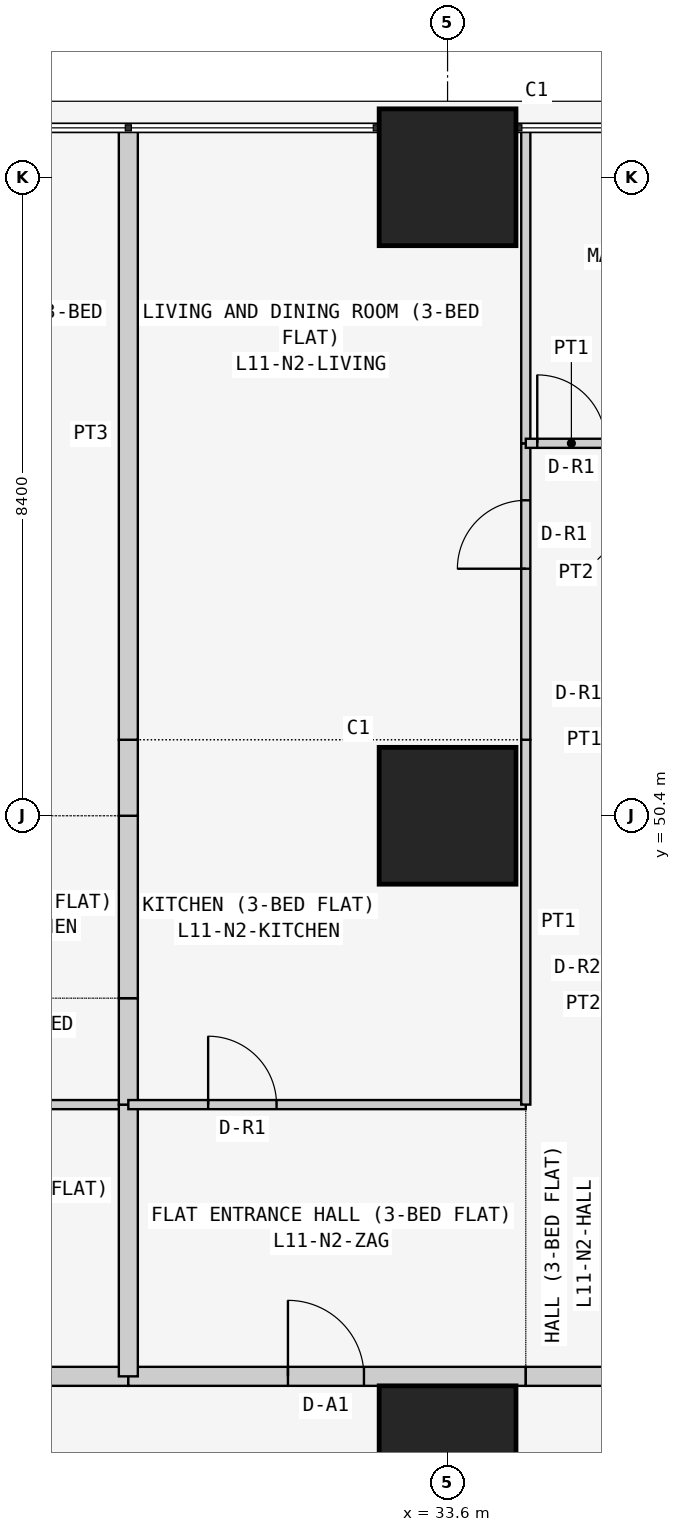
"""IFC4 building model, lengths in metres.
Left out: names, types, materials, properties, quantities, classifications, styles, units other than length and angle.
Written with IfcOpenShell. Run it as: python <this file> out.ifc"""

import sys

from ifc_helpers import new_model, si_unit, direction, frame, frame_2d, origin, origin_2d, place, context, subcontext, project, spatial, rectangle, extrude, element, fill, save


model = new_model("IFC4")
c1 = context("Model", 3, precision=1e-05, world=origin(), true_north=direction((0.0, 1.0)))
c2 = subcontext(c1, "Body", "Model", "MODEL_VIEW")
j1 = project(units=[si_unit("LENGTHUNIT", "METRE"), si_unit("PLANEANGLEUNIT", "RADIAN")], contexts=[c1])
p1 = place(None, origin())
s1 = spatial("IfcSite", under=j1, at=p1, CompositionType="ELEMENT")
p2 = place(p1, origin())
s2 = spatial("IfcBuilding", under=s1, at=p2, CompositionType="ELEMENT")
p3 = place(p2, frame((0.0, 0.0, 48.9)))
s3 = spatial("IfcBuildingStorey", under=s2, at=p3, CompositionType="ELEMENT", Elevation=48.9)
for number, where, z_axis, x_axis in (
    (1, (33.6, 42.0, 0.0), (0.0, 0.0, 1.0), (1.0, 0.0, 0.0)),
    (2, (33.6, 50.4, 0.0), (0.0, 0.0, 1.0), (1.0, 0.0, 0.0)),
    (3, (33.6, 58.8, 0.0), (0.0, 0.0, 1.0), (1.0, 0.0, 0.0)),
):
    element("IfcColumn", number, at=place(p3, frame(where, z_axis=z_axis, x_axis=x_axis)), inside=s3, PredefinedType="COLUMN", context=c2, shape_type="SweptSolid", body=[
        extrude(rectangle(XDim=1.8, YDim=1.8, at=origin_2d()), origin(), (0.0, 0.0, 1.0), 3.6),
    ])
p4 = place(p3, frame((24.171, 43.025, 0.0), z_axis=(0.0, 0.0, 1.0), x_axis=(1.0, 0.0, 0.0)))
e4 = element("IfcWall", 4, at=p4, inside=s3, PredefinedType="PARTITIONING", context=c2, shape_type="SweptSolid", body=[
    extrude(rectangle(XDim=5.229, YDim=0.25, at=frame_2d((2.615, 0.0))), origin(), (0.0, 0.0, 1.0), 3.45),
])
p5 = place(p4, frame((2.129, 0.0, 0.0)))
e5 = element("IfcOpeningElement", 5, at=p5, cuts=e4, PredefinedType="OPENING", context=c2, shape_type="SweptSolid", body=[
    extrude(rectangle(XDim=1.0, YDim=2.1, at=frame_2d((0.5, 1.05))), frame((0.0, 0.135, 0.0), z_axis=(0.0, -1.0, 0.0), x_axis=(1.0, 0.0, 0.0)), (0.0, 0.0, 1.0), 0.27),
])
p6 = place(p3, frame((29.4, 43.025, 0.0), z_axis=(0.0, 0.0, 1.0), x_axis=(1.0, 0.0, 0.0)))
e6 = element("IfcWall", 6, at=p6, inside=s3, PredefinedType="PARTITIONING", context=c2, shape_type="SweptSolid", body=[
    extrude(rectangle(XDim=5.229, YDim=0.25, at=frame_2d((2.615, 0.0))), origin(), (0.0, 0.0, 1.0), 3.45),
])
p7 = place(p6, frame((2.1, 0.0, 0.0)))
e7 = element("IfcOpeningElement", 7, at=p7, cuts=e6, PredefinedType="OPENING", context=c2, shape_type="SweptSolid", body=[
    extrude(rectangle(XDim=1.0, YDim=2.1, at=frame_2d((0.5, 1.05))), frame((0.0, 0.135, 0.0), z_axis=(0.0, -1.0, 0.0), x_axis=(1.0, 0.0, 0.0)), (0.0, 0.0, 1.0), 0.27),
])
p8 = place(p3, frame((34.629, 43.025, 0.0), z_axis=(0.0, 0.0, 1.0), x_axis=(1.0, 0.0, 0.0)))
e8 = element("IfcWall", 8, at=p8, inside=s3, PredefinedType="PARTITIONING", context=c2, shape_type="SweptSolid", body=[
    extrude(rectangle(XDim=1.2, YDim=0.25, at=frame_2d((0.6, 0.0))), origin(), (0.0, 0.0, 1.0), 3.45),
])
p9 = place(p3, frame((29.4, 46.6, 0.0), z_axis=(0.0, 0.0, 1.0), x_axis=(-1.0, 0.0, 0.0)))
e9 = element("IfcWall", 9, at=p9, inside=s3, PredefinedType="PARTITIONING", context=c2, shape_type="SweptSolid", body=[
    extrude(rectangle(XDim=5.229, YDim=0.12, at=frame_2d((2.615, 0.0))), origin(), (0.0, 0.0, 1.0), 3.45),
])
p10 = place(p3, frame((29.4, 43.025, 0.0), z_axis=(0.0, 0.0, 1.0), x_axis=(0.0, 1.0, 0.0)))
e10 = element("IfcWall", 10, at=p10, inside=s3, PredefinedType="PARTITIONING", context=c2, shape_type="SweptSolid", body=[
    extrude(rectangle(XDim=3.575, YDim=0.25, at=frame_2d((1.788, 0.0))), origin(), (0.0, 0.0, 1.0), 2.848),
])
p11 = place(p3, frame((29.4, 46.6, 0.0), z_axis=(0.0, 0.0, 1.0), x_axis=(0.0, 1.0, 0.0)))
e11 = element("IfcWall", 11, at=p11, inside=s3, PredefinedType="PARTITIONING", context=c2, shape_type="SweptSolid", body=[
    extrude(rectangle(XDim=1.4, YDim=0.25, at=frame_2d((0.7, 0.0))), origin(), (0.0, 0.0, 1.0), 2.848),
])
p12 = place(p3, frame((29.4, 48.0, 0.0), z_axis=(0.0, 0.0, 1.0), x_axis=(0.0, 1.0, 0.0)))
e12 = element("IfcWall", 12, at=p12, inside=s3, PredefinedType="PARTITIONING", context=c2, shape_type="SweptSolid", body=[
    extrude(rectangle(XDim=2.4, YDim=0.25, at=frame_2d((1.2, 0.0))), origin(), (0.0, 0.0, 1.0), 2.848),
])
p13 = place(p3, frame((29.4, 50.4, 0.0), z_axis=(0.0, 0.0, 1.0), x_axis=(0.0, 1.0, 0.0)))
e13 = element("IfcWall", 13, at=p13, inside=s3, PredefinedType="PARTITIONING", context=c2, shape_type="SweptSolid", body=[
    extrude(rectangle(XDim=1.0, YDim=0.25, at=frame_2d((0.5, 0.0))), origin(), (0.0, 0.0, 1.0), 2.848),
])
p14 = place(p3, frame((29.4, 51.4, 0.0), z_axis=(0.0, 0.0, 1.0), x_axis=(0.0, 1.0, 0.0)))
e14 = element("IfcWall", 14, at=p14, inside=s3, PredefinedType="PARTITIONING", context=c2, shape_type="SweptSolid", body=[
    extrude(rectangle(XDim=8.05, YDim=0.25, at=frame_2d((4.025, 0.0))), origin(), (0.0, 0.0, 1.0), 2.848),
])
p15 = place(p3, frame((29.4, 46.6, 0.0), z_axis=(0.0, 0.0, 1.0), x_axis=(1.0, 0.0, 0.0)))
e15 = element("IfcWall", 15, at=p15, inside=s3, PredefinedType="PARTITIONING", context=c2, shape_type="SweptSolid", body=[
    extrude(rectangle(XDim=5.229, YDim=0.12, at=frame_2d((2.615, 0.0))), origin(), (0.0, 0.0, 1.0), 3.45),
])
p16 = place(p15, frame((1.05, 0.0, 0.0)))
e16 = element("IfcOpeningElement", 16, at=p16, cuts=e15, PredefinedType="OPENING", context=c2, shape_type="SweptSolid", body=[
    extrude(rectangle(XDim=0.9, YDim=2.1, at=frame_2d((0.45, 1.05))), frame((0.0, 0.07, 0.0), z_axis=(0.0, -1.0, 0.0), x_axis=(1.0, 0.0, 0.0)), (0.0, 0.0, 1.0), 0.14),
])
p17 = place(p3, frame((34.629, 51.4, 0.0), z_axis=(0.0, 0.0, 1.0), x_axis=(0.0, -1.0, 0.0)))
e17 = element("IfcWall", 17, at=p17, inside=s3, PredefinedType="PARTITIONING", context=c2, shape_type="SweptSolid", body=[
    extrude(rectangle(XDim=4.8, YDim=0.12, at=frame_2d((2.4, 0.0))), origin(), (0.0, 0.0, 1.0), 3.45),
])
p18 = place(p3, frame((34.629, 55.3, 0.0), z_axis=(0.0, 0.0, 1.0), x_axis=(0.0, -1.0, 0.0)))
e18 = element("IfcWall", 18, at=p18, inside=s3, PredefinedType="PARTITIONING", context=c2, shape_type="SweptSolid", body=[
    extrude(rectangle(XDim=3.9, YDim=0.12, at=frame_2d((1.95, 0.0))), origin(), (0.0, 0.0, 1.0), 3.45),
])
p19 = place(p18, frame((0.75, 0.0, 0.0)))
e19 = element("IfcOpeningElement", 19, at=p19, cuts=e18, PredefinedType="OPENING", context=c2, shape_type="SweptSolid", body=[
    extrude(rectangle(XDim=0.9, YDim=2.1, at=frame_2d((0.45, 1.05))), frame((0.0, 0.07, 0.0), z_axis=(0.0, -1.0, 0.0), x_axis=(1.0, 0.0, 0.0)), (0.0, 0.0, 1.0), 0.14),
])
p20 = place(p3, frame((34.629, 59.45, 0.0), z_axis=(0.0, 0.0, 1.0), x_axis=(0.0, -1.0, 0.0)))
e20 = element("IfcWall", 20, at=p20, inside=s3, PredefinedType="PARTITIONING", context=c2, shape_type="SweptSolid", body=[
    extrude(rectangle(XDim=4.15, YDim=0.12, at=frame_2d((2.075, 0.0))), origin(), (0.0, 0.0, 1.0), 3.45),
])
p21 = place(p3, frame((34.629, 55.3, 0.0), z_axis=(0.0, 0.0, 1.0), x_axis=(1.0, 0.0, 0.0)))
e21 = element("IfcWall", 21, at=p21, inside=s3, PredefinedType="PARTITIONING", context=c2, shape_type="SweptSolid", body=[
    extrude(rectangle(XDim=1.2, YDim=0.12, at=frame_2d((0.6, 0.0))), origin(), (0.0, 0.0, 1.0), 3.45),
])
p22 = place(p21, frame((0.151, 0.0, 0.0)))
e22 = element("IfcOpeningElement", 22, at=p22, cuts=e21, PredefinedType="OPENING", context=c2, shape_type="SweptSolid", body=[
    extrude(rectangle(XDim=0.9, YDim=2.1, at=frame_2d((0.45, 1.05))), frame((0.0, 0.07, 0.0), z_axis=(0.0, -1.0, 0.0), x_axis=(1.0, 0.0, 0.0)), (0.0, 0.0, 1.0), 0.14),
])
p23 = place(p7, origin())
e23 = element("IfcDoor", 23, at=p23, inside=s3, OperationType="SINGLE_SWING_LEFT", PredefinedType="DOOR", context=c2, shape_type="SweptSolid", body=[
    extrude(rectangle(XDim=1.0, YDim=2.1, at=frame_2d((0.5, 1.05))), frame((0.0, 0.025, 0.0), z_axis=(0.0, -1.0, 0.0), x_axis=(1.0, 0.0, 0.0)), (0.0, 0.0, 1.0), 0.05),
])
fill(e7, e23)
p24 = place(p16, origin())
e24 = element("IfcDoor", 24, at=p24, inside=s3, OperationType="SINGLE_SWING_LEFT", PredefinedType="DOOR", context=c2, shape_type="SweptSolid", body=[
    extrude(rectangle(XDim=0.9, YDim=2.1, at=frame_2d((0.45, 1.05))), frame((0.0, 0.025, 0.0), z_axis=(0.0, -1.0, 0.0), x_axis=(1.0, 0.0, 0.0)), (0.0, 0.0, 1.0), 0.05),
])
fill(e16, e24)
p25 = place(p19, frame((0.9, 0.0, 0.0), z_axis=(0.0, 0.0, 1.0), x_axis=(-1.0, 0.0, 0.0)))
e25 = element("IfcDoor", 25, at=p25, inside=s3, OperationType="SINGLE_SWING_LEFT", PredefinedType="DOOR", context=c2, shape_type="SweptSolid", body=[
    extrude(rectangle(XDim=0.9, YDim=2.1, at=frame_2d((0.45, 1.05))), frame((0.0, 0.025, 0.0), z_axis=(0.0, -1.0, 0.0), x_axis=(1.0, 0.0, 0.0)), (0.0, 0.0, 1.0), 0.05),
])
fill(e19, e25)
p26 = place(p22, origin())
e26 = element("IfcDoor", 26, at=p26, inside=s3, OperationType="SINGLE_SWING_LEFT", PredefinedType="DOOR", context=c2, shape_type="SweptSolid", body=[
    extrude(rectangle(XDim=0.9, YDim=2.1, at=frame_2d((0.45, 1.05))), frame((0.0, 0.025, 0.0), z_axis=(0.0, -1.0, 0.0), x_axis=(1.0, 0.0, 0.0)), (0.0, 0.0, 1.0), 0.05),
])
fill(e22, e26)
save(model, sys.argv[1])
